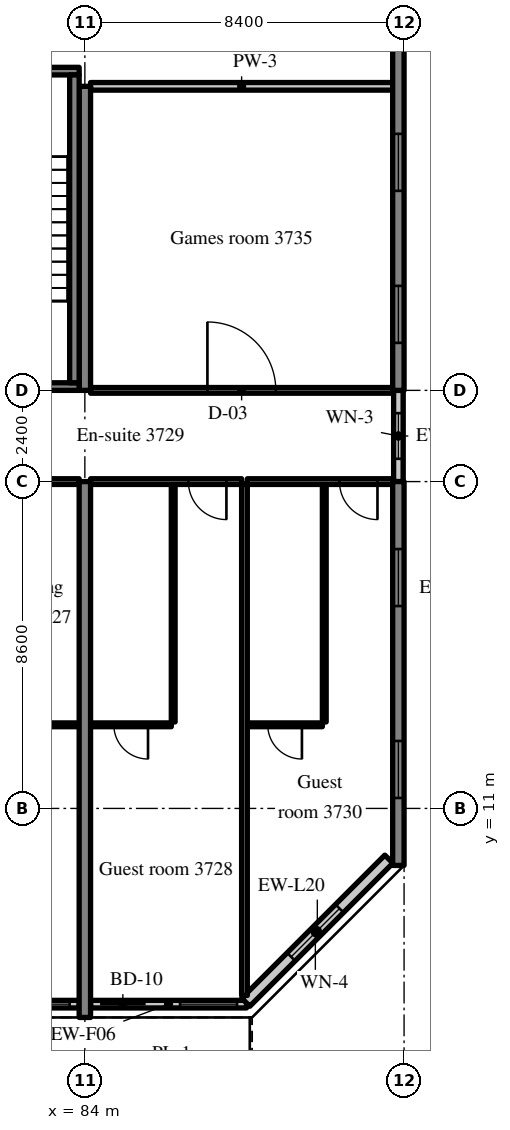
"""IFC4 building model, lengths in metres.
Left out: names, types, materials, properties, quantities, classifications, styles, units other than length and angle.
Written with IfcOpenShell. Run it as: python <this file> out.ifc"""

import sys

from ifc_helpers import new_model, si_unit, direction, frame, frame_2d, origin, place, context, subcontext, project, spatial, rectangle, extrude, source, transform, mapped, element, fill, save


model = new_model("IFC4")
c1 = context("Model", 3, precision=1e-05, world=origin(), true_north=direction((0.0, 1.0)))
c2 = subcontext(c1, "Body", "Model", "MODEL_VIEW")
j1 = project(units=[si_unit("LENGTHUNIT", "METRE"), si_unit("PLANEANGLEUNIT", "RADIAN")], contexts=[c1])
p1 = place(None, origin())
s1 = spatial("IfcSite", under=j1, at=p1, CompositionType="ELEMENT")
p2 = place(p1, origin())
s2 = spatial("IfcBuilding", under=s1, at=p2, CompositionType="ELEMENT")
p3 = place(p2, frame((0.0, 0.0, 155.4)))
s3 = spatial("IfcBuildingStorey", under=s2, at=p3, CompositionType="ELEMENT", Elevation=155.4)
m1 = source(origin(), c2, "Body", "SweptSolid", [
    extrude(rectangle(XDim=14.1, YDim=0.3, at=frame_2d((7.05, 0.0))), origin(), (0.0, 0.0, 1.0), 3.52),
])
p4 = place(p3, frame((84.0, 5.5, 0.0), z_axis=(0.0, 0.0, 1.0), x_axis=(0.0, 1.0, 0.0)))
e1 = element("IfcWall", 1, at=p4, inside=s3, PredefinedType="SHEAR", context=c2, shape_type="MappedRepresentation", body=[
    mapped(m1, transform((0.0, 0.0, 0.0), scale=1.0)),
])
m2 = source(origin(), c2, "Body", "SweptSolid", [
    extrude(rectangle(XDim=8.0, YDim=0.3, at=frame_2d((4.0, 0.0))), origin(), (0.0, 0.0, 1.0), 3.52),
])
p5 = place(p3, frame((84.0, 22.0, 0.0), z_axis=(0.0, 0.0, 1.0), x_axis=(0.0, 1.0, 0.0)))
e2 = element("IfcWall", 2, at=p5, inside=s3, PredefinedType="SHEAR", context=c2, shape_type="MappedRepresentation", body=[
    mapped(m2, transform((0.0, 0.0, 0.0), scale=1.0)),
])
m3 = source(origin(), c2, "Body", "SweptSolid", [
    extrude(rectangle(XDim=10.1, YDim=0.3, at=frame_2d((5.05, 0.0))), origin(), (0.0, 0.0, 1.0), 3.52),
])
p6 = place(p3, frame((92.25, 9.5, 0.0), z_axis=(0.0, 0.0, 1.0), x_axis=(0.0, 1.0, 0.0)))
e3 = element("IfcWall", 3, at=p6, inside=s3, PredefinedType="SHEAR", context=c2, shape_type="MappedRepresentation", body=[
    mapped(m3, transform((0.0, 0.0, 0.0), scale=1.0)),
])
m4 = source(origin(), c2, "Body", "SweptSolid", [
    extrude(rectangle(XDim=1.5, YDim=1.5, at=frame_2d((0.75, 0.75))), frame((0.0, 0.16, 0.0), z_axis=(0.0, -1.0, 0.0), x_axis=(1.0, 0.0, 0.0)), (0.0, 0.0, 1.0), 0.32),
])
p7 = place(p6, frame((1.775, 0.0, 0.9)))
e4 = element("IfcOpeningElement", 4, at=p7, cuts=e3, PredefinedType="OPENING", context=c2, shape_type="MappedRepresentation", body=[
    mapped(m4, transform((0.0, 0.0, 0.0), scale=1.0)),
])
p8 = place(p6, frame((6.825, 0.0, 0.9)))
e5 = element("IfcOpeningElement", 5, at=p8, cuts=e3, PredefinedType="OPENING", context=c2, shape_type="MappedRepresentation", body=[
    mapped(m4, transform((0.0, 0.0, 0.0), scale=1.0)),
])
m5 = source(origin(), c2, "Body", "SweptSolid", [
    extrude(rectangle(XDim=16.0, YDim=0.3, at=frame_2d((8.0, 0.0))), origin(), (0.0, 0.0, 1.0), 3.52),
])
p9 = place(p3, frame((92.25, 22.0, 0.0), z_axis=(0.0, 0.0, 1.0), x_axis=(0.0, 1.0, 0.0)))
e6 = element("IfcWall", 6, at=p9, inside=s3, PredefinedType="SHEAR", context=c2, shape_type="MappedRepresentation", body=[
    mapped(m5, transform((0.0, 0.0, 0.0), scale=1.0)),
])
p10 = place(p9, frame((1.25, 0.0, 0.9)))
e7 = element("IfcOpeningElement", 7, at=p10, cuts=e6, PredefinedType="OPENING", context=c2, shape_type="MappedRepresentation", body=[
    mapped(m4, transform((0.0, 0.0, 0.0), scale=1.0)),
])
p11 = place(p9, frame((5.25, 0.0, 0.9)))
e8 = element("IfcOpeningElement", 8, at=p11, cuts=e6, PredefinedType="OPENING", context=c2, shape_type="MappedRepresentation", body=[
    mapped(m4, transform((0.0, 0.0, 0.0), scale=1.0)),
])
p12 = place(p9, frame((9.25, 0.0, 0.9)))
e9 = element("IfcOpeningElement", 9, at=p12, cuts=e6, PredefinedType="OPENING", context=c2, shape_type="MappedRepresentation", body=[
    mapped(m4, transform((0.0, 0.0, 0.0), scale=1.0)),
])
p13 = place(p9, frame((13.25, 0.0, 0.9)))
e10 = element("IfcOpeningElement", 10, at=p13, cuts=e6, PredefinedType="OPENING", context=c2, shape_type="MappedRepresentation", body=[
    mapped(m4, transform((0.0, 0.0, 0.0), scale=1.0)),
])
m6 = source(origin(), c2, "Body", "SweptSolid", [
    extrude(rectangle(XDim=8.1, YDim=0.2, at=frame_2d((4.05, 0.0))), origin(), (0.0, 0.0, 1.0), 2.87),
])
p14 = place(p3, frame((75.75, 5.85, 0.0), z_axis=(0.0, 0.0, 1.0), x_axis=(1.0, 0.0, 0.0)))
e11 = element("IfcWall", 11, at=p14, inside=s3, PredefinedType="SOLIDWALL", context=c2, shape_type="MappedRepresentation", body=[
    mapped(m6, transform((0.0, 0.0, 0.0), scale=1.0)),
])
m7 = source(origin(), c2, "Body", "SweptSolid", [
    extrude(rectangle(XDim=1.2, YDim=2.4, at=frame_2d((0.6, 1.2))), frame((0.0, 0.11, 0.0), z_axis=(0.0, -1.0, 0.0), x_axis=(1.0, 0.0, 0.0)), (0.0, 0.0, 1.0), 0.22),
])
p15 = place(p14, frame((0.25, 0.0, 0.0)))
e12 = element("IfcOpeningElement", 12, at=p15, cuts=e11, PredefinedType="OPENING", context=c2, shape_type="MappedRepresentation", body=[
    mapped(m7, transform((0.0, 0.0, 0.0), scale=1.0)),
])
m8 = source(origin(), c2, "Body", "SweptSolid", [
    extrude(rectangle(XDim=1.5, YDim=1.5, at=frame_2d((0.75, 0.75))), frame((0.0, 0.11, 0.0), z_axis=(0.0, -1.0, 0.0), x_axis=(1.0, 0.0, 0.0)), (0.0, 0.0, 1.0), 0.22),
])
p16 = place(p14, frame((2.3, 0.0, 0.9)))
e13 = element("IfcOpeningElement", 13, at=p16, cuts=e11, PredefinedType="OPENING", context=c2, shape_type="MappedRepresentation", body=[
    mapped(m8, transform((0.0, 0.0, 0.0), scale=1.0)),
])
p17 = place(p14, frame((4.3, 0.0, 0.0)))
e14 = element("IfcOpeningElement", 14, at=p17, cuts=e11, PredefinedType="OPENING", context=c2, shape_type="MappedRepresentation", body=[
    mapped(m7, transform((0.0, 0.0, 0.0), scale=1.0)),
])
p18 = place(p14, frame((6.35, 0.0, 0.9)))
e15 = element("IfcOpeningElement", 15, at=p18, cuts=e11, PredefinedType="OPENING", context=c2, shape_type="MappedRepresentation", body=[
    mapped(m8, transform((0.0, 0.0, 0.0), scale=1.0)),
])
m9 = source(origin(), c2, "Body", "SweptSolid", [
    extrude(rectangle(XDim=4.105, YDim=0.2, at=frame_2d((2.052, 0.0))), origin(), (0.0, 0.0, 1.0), 2.87),
])
p19 = place(p3, frame((84.15, 5.85, 0.0), z_axis=(0.0, 0.0, 1.0), x_axis=(1.0, 0.0, 0.0)))
e16 = element("IfcWall", 16, at=p19, inside=s3, PredefinedType="SOLIDWALL", context=c2, shape_type="MappedRepresentation", body=[
    mapped(m9, transform((0.0, 0.0, 0.0), scale=1.0)),
])
p20 = place(p19, frame((0.25, 0.0, 0.0)))
e17 = element("IfcOpeningElement", 17, at=p20, cuts=e16, PredefinedType="OPENING", context=c2, shape_type="MappedRepresentation", body=[
    mapped(m7, transform((0.0, 0.0, 0.0), scale=1.0)),
])
p21 = place(p19, frame((2.355, 0.0, 0.9)))
e18 = element("IfcOpeningElement", 18, at=p21, cuts=e16, PredefinedType="OPENING", context=c2, shape_type="MappedRepresentation", body=[
    mapped(m8, transform((0.0, 0.0, 0.0), scale=1.0)),
])
m10 = source(origin(), c2, "Body", "SweptSolid", [
    extrude(rectangle(XDim=5.326, YDim=0.3, at=frame_2d((2.663, 0.0))), origin(), (0.0, 0.0, 1.0), 3.52),
])
p22 = place(p3, frame((88.234, 5.9, 0.0), z_axis=(0.0, 0.0, 1.0), x_axis=(0.707083859269, 0.707129702361, 0.0)))
e19 = element("IfcWall", 19, at=p22, inside=s3, PredefinedType="SOLIDWALL", context=c2, shape_type="MappedRepresentation", body=[
    mapped(m10, transform((0.0, 0.0, 0.0), scale=1.0)),
])
m11 = source(origin(), c2, "Body", "SweptSolid", [
    extrude(rectangle(XDim=1.8, YDim=1.5, at=frame_2d((0.9, 0.75))), frame((0.0, 0.16, 0.0), z_axis=(0.0, -1.0, 0.0), x_axis=(1.0, 0.0, 0.0)), (0.0, 0.0, 1.0), 0.32),
])
p23 = place(p22, frame((1.689, 0.0, 0.9)))
e20 = element("IfcOpeningElement", 20, at=p23, cuts=e19, PredefinedType="OPENING", context=c2, shape_type="MappedRepresentation", body=[
    mapped(m11, transform((0.0, 0.0, 0.0), scale=1.0)),
])
m12 = source(origin(), c2, "Body", "SweptSolid", [
    extrude(rectangle(XDim=2.4, YDim=0.25, at=frame_2d((1.2, 0.0))), origin(), (0.0, 0.0, 1.0), 2.62),
])
p24 = place(p3, frame((92.25, 19.6, 0.0), z_axis=(0.0, 0.0, 1.0), x_axis=(0.0, 1.0, 0.0)))
e21 = element("IfcWall", 21, at=p24, inside=s3, PredefinedType="SOLIDWALL", context=c2, shape_type="MappedRepresentation", body=[
    mapped(m12, transform((0.0, 0.0, 0.0), scale=1.0)),
])
m13 = source(origin(), c2, "Body", "SweptSolid", [
    extrude(rectangle(XDim=1.2, YDim=1.5, at=frame_2d((0.6, 0.75))), frame((0.0, 0.135, 0.0), z_axis=(0.0, -1.0, 0.0), x_axis=(1.0, 0.0, 0.0)), (0.0, 0.0, 1.0), 0.27),
])
p25 = place(p24, frame((0.6, 0.0, 0.9)))
e22 = element("IfcOpeningElement", 22, at=p25, cuts=e21, PredefinedType="OPENING", context=c2, shape_type="MappedRepresentation", body=[
    mapped(m13, transform((0.0, 0.0, 0.0), scale=1.0)),
])
m14 = source(origin(), c2, "Body", "SweptSolid", [
    extrude(rectangle(XDim=8.25, YDim=0.2, at=frame_2d((4.125, 0.0))), origin(), (0.0, 0.0, 1.0), 3.52),
])
p26 = place(p3, frame((83.85, 22.1, 0.0), z_axis=(0.0, 0.0, 1.0), x_axis=(-1.0, 0.0, 0.0)))
e23 = element("IfcWall", 23, at=p26, inside=s3, PredefinedType="SOLIDWALL", context=c2, shape_type="MappedRepresentation", body=[
    mapped(m14, transform((0.0, 0.0, 0.0), scale=1.0)),
])
m15 = source(origin(), c2, "Body", "SweptSolid", [
    extrude(rectangle(XDim=1.2, YDim=2.1, at=frame_2d((0.6, 1.05))), frame((0.0, 0.11, 0.0), z_axis=(0.0, -1.0, 0.0), x_axis=(1.0, 0.0, 0.0)), (0.0, 0.0, 1.0), 0.22),
])
p27 = place(p26, frame((6.05, 0.0, 0.0)))
e24 = element("IfcOpeningElement", 24, at=p27, cuts=e23, PredefinedType="OPENING", context=c2, shape_type="MappedRepresentation", body=[
    mapped(m15, transform((0.0, 0.0, 0.0), scale=1.0)),
])
p28 = place(p3, frame((83.85, 30.4, 0.0), z_axis=(0.0, 0.0, 1.0), x_axis=(-1.0, 0.0, 0.0)))
e25 = element("IfcWall", 25, at=p28, inside=s3, PredefinedType="SOLIDWALL", context=c2, shape_type="MappedRepresentation", body=[
    mapped(m14, transform((0.0, 0.0, 0.0), scale=1.0)),
])
m16 = source(origin(), c2, "Body", "SweptSolid", [
    extrude(rectangle(XDim=1.0, YDim=2.1, at=frame_2d((0.5, 1.05))), frame((0.0, 0.11, 0.0), z_axis=(0.0, -1.0, 0.0), x_axis=(1.0, 0.0, 0.0)), (0.0, 0.0, 1.0), 0.22),
])
p29 = place(p28, frame((6.15, 0.0, 0.0)))
e26 = element("IfcOpeningElement", 26, at=p29, cuts=e25, PredefinedType="OPENING", context=c2, shape_type="MappedRepresentation", body=[
    mapped(m16, transform((0.0, 0.0, 0.0), scale=1.0)),
])
m17 = source(origin(), c2, "Body", "SweptSolid", [
    extrude(rectangle(XDim=8.1, YDim=0.25, at=frame_2d((4.05, 0.0))), origin(), (0.0, 0.0, 1.0), 3.52),
])
p30 = place(p3, frame((83.725, 22.2, 0.0), z_axis=(0.0, 0.0, 1.0), x_axis=(0.0, 1.0, 0.0)))
e27 = element("IfcWall", 27, at=p30, inside=s3, PredefinedType="SOLIDWALL", context=c2, shape_type="MappedRepresentation", body=[
    mapped(m17, transform((0.0, 0.0, 0.0), scale=1.0)),
])
m18 = source(origin(), c2, "Body", "SweptSolid", [
    extrude(rectangle(XDim=2.65, YDim=0.1, at=frame_2d((1.325, 0.0))), origin(), (0.0, 0.0, 1.0), 3.52),
])
p31 = place(p3, frame((81.2, 13.2, 0.0), z_axis=(0.0, 0.0, 1.0), x_axis=(1.0, 0.0, 0.0)))
e28 = element("IfcWall", 28, at=p31, inside=s3, PredefinedType="PARTITIONING", context=c2, shape_type="MappedRepresentation", body=[
    mapped(m18, transform((0.0, 0.0, 0.0), scale=1.0)),
])
m19 = source(origin(), c2, "Body", "SweptSolid", [
    extrude(rectangle(XDim=0.9, YDim=2.1, at=frame_2d((0.45, 1.05))), frame((0.0, 0.06, 0.0), z_axis=(0.0, -1.0, 0.0), x_axis=(1.0, 0.0, 0.0)), (0.0, 0.0, 1.0), 0.12),
])
p32 = place(p31, frame((0.875, 0.0, 0.0)))
e29 = element("IfcOpeningElement", 29, at=p32, cuts=e28, PredefinedType="OPENING", context=c2, shape_type="MappedRepresentation", body=[
    mapped(m19, transform((0.0, 0.0, 0.0), scale=1.0)),
])
m20 = source(origin(), c2, "Body", "SweptSolid", [
    extrude(rectangle(XDim=8.1, YDim=0.15, at=frame_2d((4.05, 0.0))), origin(), (0.0, 0.0, 1.0), 2.82),
])
p33 = place(p3, frame((75.75, 19.6, 0.0), z_axis=(0.0, 0.0, 1.0), x_axis=(1.0, 0.0, 0.0)))
e30 = element("IfcWall", 30, at=p33, inside=s3, PredefinedType="PARTITIONING", context=c2, shape_type="MappedRepresentation", body=[
    mapped(m20, transform((0.0, 0.0, 0.0), scale=1.0)),
])
m21 = source(origin(), c2, "Body", "SweptSolid", [
    extrude(rectangle(XDim=1.0, YDim=2.1, at=frame_2d((0.5, 1.05))), frame((0.0, 0.085, 0.0), z_axis=(0.0, -1.0, 0.0), x_axis=(1.0, 0.0, 0.0)), (0.0, 0.0, 1.0), 0.17),
])
p34 = place(p33, frame((0.4, 0.0, 0.0)))
e31 = element("IfcOpeningElement", 31, at=p34, cuts=e30, PredefinedType="OPENING", context=c2, shape_type="MappedRepresentation", body=[
    mapped(m21, transform((0.0, 0.0, 0.0), scale=1.0)),
])
m22 = source(origin(), c2, "Body", "SweptSolid", [
    extrude(rectangle(XDim=6.25, YDim=0.1, at=frame_2d((3.125, 0.0))), origin(), (0.0, 0.0, 1.0), 3.52),
])
p35 = place(p3, frame((86.325, 13.275, 0.0), z_axis=(0.0, 0.0, 1.0), x_axis=(0.0, 1.0, 0.0)))
e32 = element("IfcWall", 32, at=p35, inside=s3, PredefinedType="PARTITIONING", context=c2, shape_type="MappedRepresentation", body=[
    mapped(m22, transform((0.0, 0.0, 0.0), scale=1.0)),
])
m23 = source(origin(), c2, "Body", "SweptSolid", [
    extrude(rectangle(XDim=2.125, YDim=0.1, at=frame_2d((1.062, 0.0))), origin(), (0.0, 0.0, 1.0), 3.52),
])
p36 = place(p3, frame((84.15, 13.2, 0.0), z_axis=(0.0, 0.0, 1.0), x_axis=(1.0, 0.0, 0.0)))
e33 = element("IfcWall", 33, at=p36, inside=s3, PredefinedType="PARTITIONING", context=c2, shape_type="MappedRepresentation", body=[
    mapped(m23, transform((0.0, 0.0, 0.0), scale=1.0)),
])
p37 = place(p36, frame((0.612, 0.0, 0.0)))
e34 = element("IfcOpeningElement", 34, at=p37, cuts=e33, PredefinedType="OPENING", context=c2, shape_type="MappedRepresentation", body=[
    mapped(m19, transform((0.0, 0.0, 0.0), scale=1.0)),
])
m24 = source(origin(), c2, "Body", "SweptSolid", [
    extrude(rectangle(XDim=3.975, YDim=0.15, at=frame_2d((1.988, 0.0))), origin(), (0.0, 0.0, 1.0), 2.82),
])
p38 = place(p3, frame((84.15, 19.6, 0.0), z_axis=(0.0, 0.0, 1.0), x_axis=(1.0, 0.0, 0.0)))
e35 = element("IfcWall", 35, at=p38, inside=s3, PredefinedType="PARTITIONING", context=c2, shape_type="MappedRepresentation", body=[
    mapped(m24, transform((0.0, 0.0, 0.0), scale=1.0)),
])
p39 = place(p38, frame((2.575, 0.0, 0.0)))
e36 = element("IfcOpeningElement", 36, at=p39, cuts=e35, PredefinedType="OPENING", context=c2, shape_type="MappedRepresentation", body=[
    mapped(m21, transform((0.0, 0.0, 0.0), scale=1.0)),
])
p40 = place(p3, frame((90.3, 13.275, 0.0), z_axis=(0.0, 0.0, 1.0), x_axis=(0.0, 1.0, 0.0)))
e37 = element("IfcWall", 37, at=p40, inside=s3, PredefinedType="PARTITIONING", context=c2, shape_type="MappedRepresentation", body=[
    mapped(m22, transform((0.0, 0.0, 0.0), scale=1.0)),
])
m25 = source(origin(), c2, "Body", "SweptSolid", [
    extrude(rectangle(XDim=1.975, YDim=0.1, at=frame_2d((0.988, 0.0))), origin(), (0.0, 0.0, 1.0), 3.52),
])
p41 = place(p3, frame((88.275, 13.2, 0.0), z_axis=(0.0, 0.0, 1.0), x_axis=(1.0, 0.0, 0.0)))
e38 = element("IfcWall", 38, at=p41, inside=s3, PredefinedType="PARTITIONING", context=c2, shape_type="MappedRepresentation", body=[
    mapped(m25, transform((0.0, 0.0, 0.0), scale=1.0)),
])
p42 = place(p41, frame((0.537, 0.0, 0.0)))
e39 = element("IfcOpeningElement", 39, at=p42, cuts=e38, PredefinedType="OPENING", context=c2, shape_type="MappedRepresentation", body=[
    mapped(m19, transform((0.0, 0.0, 0.0), scale=1.0)),
])
m26 = source(origin(), c2, "Body", "SweptSolid", [
    extrude(rectangle(XDim=3.825, YDim=0.15, at=frame_2d((1.913, 0.0))), origin(), (0.0, 0.0, 1.0), 2.82),
])
p43 = place(p3, frame((88.275, 19.6, 0.0), z_axis=(0.0, 0.0, 1.0), x_axis=(1.0, 0.0, 0.0)))
e40 = element("IfcWall", 40, at=p43, inside=s3, PredefinedType="PARTITIONING", context=c2, shape_type="MappedRepresentation", body=[
    mapped(m26, transform((0.0, 0.0, 0.0), scale=1.0)),
])
p44 = place(p43, frame((2.425, 0.0, 0.0)))
e41 = element("IfcOpeningElement", 41, at=p44, cuts=e40, PredefinedType="OPENING", context=c2, shape_type="MappedRepresentation", body=[
    mapped(m21, transform((0.0, 0.0, 0.0), scale=1.0)),
])
m27 = source(origin(), c2, "Body", "SweptSolid", [
    extrude(rectangle(XDim=13.447, YDim=0.15, at=frame_2d((6.724, 0.0))), origin(), (0.0, 0.0, 1.0), 3.52),
])
p45 = place(p3, frame((88.2, 6.078, 0.0), z_axis=(0.0, 0.0, 1.0), x_axis=(0.0, 1.0, 0.0)))
e42 = element("IfcWall", 42, at=p45, inside=s3, PredefinedType="PARTITIONING", context=c2, shape_type="MappedRepresentation", body=[
    mapped(m27, transform((0.0, 0.0, 0.0), scale=1.0)),
])
m28 = source(origin(), c2, "Body", "SweptSolid", [
    extrude(rectangle(XDim=7.95, YDim=0.15, at=frame_2d((3.975, 0.0))), origin(), (0.0, 0.0, 1.0), 2.82),
])
p46 = place(p3, frame((84.15, 22.0, 0.0), z_axis=(0.0, 0.0, 1.0), x_axis=(1.0, 0.0, 0.0)))
e43 = element("IfcWall", 43, at=p46, inside=s3, PredefinedType="PARTITIONING", context=c2, shape_type="MappedRepresentation", body=[
    mapped(m28, transform((0.0, 0.0, 0.0), scale=1.0)),
])
m29 = source(origin(), c2, "Body", "SweptSolid", [
    extrude(rectangle(XDim=1.8, YDim=2.1, at=frame_2d((0.9, 1.05))), frame((0.0, 0.085, 0.0), z_axis=(0.0, -1.0, 0.0), x_axis=(1.0, 0.0, 0.0)), (0.0, 0.0, 1.0), 0.17),
])
p47 = place(p46, frame((3.075, 0.0, 0.0)))
e44 = element("IfcOpeningElement", 44, at=p47, cuts=e43, PredefinedType="OPENING", context=c2, shape_type="MappedRepresentation", body=[
    mapped(m29, transform((0.0, 0.0, 0.0), scale=1.0)),
])
m30 = source(origin(), c2, "Body", "SweptSolid", [
    extrude(rectangle(XDim=7.95, YDim=0.2, at=frame_2d((3.975, 0.0))), origin(), (0.0, 0.0, 1.0), 3.52),
])
p48 = place(p3, frame((84.15, 30.0, 0.0), z_axis=(0.0, 0.0, 1.0), x_axis=(1.0, 0.0, 0.0)))
e45 = element("IfcWall", 45, at=p48, inside=s3, PredefinedType="PARTITIONING", context=c2, shape_type="MappedRepresentation", body=[
    mapped(m30, transform((0.0, 0.0, 0.0), scale=1.0)),
])
m31 = source(origin(), c2, "Body", "SweptSolid", [
    extrude(rectangle(XDim=1.5, YDim=1.5, at=frame_2d((0.75, 0.75))), frame((0.0, 0.03, 0.0), z_axis=(0.0, -1.0, 0.0), x_axis=(1.0, 0.0, 0.0)), (0.0, 0.0, 1.0), 0.06),
])
p49 = place(p18, origin())
e46 = element("IfcWindow", 46, at=p49, inside=s3, PartitioningType="SINGLE_PANEL", PredefinedType="WINDOW", context=c2, shape_type="MappedRepresentation", body=[
    mapped(m31, transform((0.0, 0.0, 0.0), scale=1.0)),
])
fill(e15, e46)
m32 = source(origin(), c2, "Body", "SweptSolid", [
    extrude(rectangle(XDim=1.2, YDim=2.4, at=frame_2d((0.6, 1.2))), frame((0.0, 0.025, 0.0), z_axis=(0.0, -1.0, 0.0), x_axis=(1.0, 0.0, 0.0)), (0.0, 0.0, 1.0), 0.05),
])
p50 = place(p20, origin())
e47 = element("IfcDoor", 47, at=p50, inside=s3, OperationType="SLIDING_TO_RIGHT", PredefinedType="DOOR", context=c2, shape_type="MappedRepresentation", body=[
    mapped(m32, transform((0.0, 0.0, 0.0), scale=1.0)),
])
fill(e17, e47)
p51 = place(p21, origin())
e48 = element("IfcWindow", 48, at=p51, inside=s3, PartitioningType="SINGLE_PANEL", PredefinedType="WINDOW", context=c2, shape_type="MappedRepresentation", body=[
    mapped(m31, transform((0.0, 0.0, 0.0), scale=1.0)),
])
fill(e18, e48)
m33 = source(origin(), c2, "Body", "SweptSolid", [
    extrude(rectangle(XDim=1.8, YDim=1.5, at=frame_2d((0.9, 0.75))), frame((0.0, 0.03, 0.0), z_axis=(0.0, -1.0, 0.0), x_axis=(1.0, 0.0, 0.0)), (0.0, 0.0, 1.0), 0.06),
])
p52 = place(p23, origin())
e49 = element("IfcWindow", 49, at=p52, inside=s3, PartitioningType="SINGLE_PANEL", PredefinedType="WINDOW", context=c2, shape_type="MappedRepresentation", body=[
    mapped(m33, transform((0.0, 0.0, 0.0), scale=1.0)),
])
fill(e20, e49)
p53 = place(p7, origin())
e50 = element("IfcWindow", 50, at=p53, inside=s3, PartitioningType="SINGLE_PANEL", PredefinedType="WINDOW", context=c2, shape_type="MappedRepresentation", body=[
    mapped(m31, transform((0.0, 0.0, 0.0), scale=1.0)),
])
fill(e4, e50)
p54 = place(p8, origin())
e51 = element("IfcWindow", 51, at=p54, inside=s3, PartitioningType="SINGLE_PANEL", PredefinedType="WINDOW", context=c2, shape_type="MappedRepresentation", body=[
    mapped(m31, transform((0.0, 0.0, 0.0), scale=1.0)),
])
fill(e5, e51)
p55 = place(p10, origin())
e52 = element("IfcWindow", 52, at=p55, inside=s3, PartitioningType="SINGLE_PANEL", PredefinedType="WINDOW", context=c2, shape_type="MappedRepresentation", body=[
    mapped(m31, transform((0.0, 0.0, 0.0), scale=1.0)),
])
fill(e7, e52)
p56 = place(p11, origin())
e53 = element("IfcWindow", 53, at=p56, inside=s3, PartitioningType="SINGLE_PANEL", PredefinedType="WINDOW", context=c2, shape_type="MappedRepresentation", body=[
    mapped(m31, transform((0.0, 0.0, 0.0), scale=1.0)),
])
fill(e8, e53)
m34 = source(origin(), c2, "Body", "SweptSolid", [
    extrude(rectangle(XDim=1.2, YDim=1.5, at=frame_2d((0.6, 0.75))), frame((0.0, 0.03, 0.0), z_axis=(0.0, -1.0, 0.0), x_axis=(1.0, 0.0, 0.0)), (0.0, 0.0, 1.0), 0.06),
])
p57 = place(p25, origin())
e54 = element("IfcWindow", 54, at=p57, inside=s3, PartitioningType="SINGLE_PANEL", PredefinedType="WINDOW", context=c2, shape_type="MappedRepresentation", body=[
    mapped(m34, transform((0.0, 0.0, 0.0), scale=1.0)),
])
fill(e22, e54)
m35 = source(origin(), c2, "Body", "SweptSolid", [
    extrude(rectangle(XDim=0.9, YDim=2.1, at=frame_2d((0.45, 1.05))), frame((0.0, 0.025, 0.0), z_axis=(0.0, -1.0, 0.0), x_axis=(1.0, 0.0, 0.0)), (0.0, 0.0, 1.0), 0.05),
])
p58 = place(p37, origin())
e55 = element("IfcDoor", 55, at=p58, inside=s3, OperationType="SINGLE_SWING_RIGHT", PredefinedType="DOOR", context=c2, shape_type="MappedRepresentation", body=[
    mapped(m35, transform((0.0, 0.0, 0.0), scale=1.0)),
])
fill(e34, e55)
m36 = source(origin(), c2, "Body", "SweptSolid", [
    extrude(rectangle(XDim=1.0, YDim=2.1, at=frame_2d((0.5, 1.05))), frame((0.0, 0.025, 0.0), z_axis=(0.0, -1.0, 0.0), x_axis=(1.0, 0.0, 0.0)), (0.0, 0.0, 1.0), 0.05),
])
p59 = place(p39, origin())
e56 = element("IfcDoor", 56, at=p59, inside=s3, OperationType="SINGLE_SWING_RIGHT", PredefinedType="DOOR", context=c2, shape_type="MappedRepresentation", body=[
    mapped(m36, transform((0.0, 0.0, 0.0), scale=1.0)),
])
fill(e36, e56)
p60 = place(p42, origin())
e57 = element("IfcDoor", 57, at=p60, inside=s3, OperationType="SINGLE_SWING_RIGHT", PredefinedType="DOOR", context=c2, shape_type="MappedRepresentation", body=[
    mapped(m35, transform((0.0, 0.0, 0.0), scale=1.0)),
])
fill(e39, e57)
p61 = place(p44, origin())
e58 = element("IfcDoor", 58, at=p61, inside=s3, OperationType="SINGLE_SWING_RIGHT", PredefinedType="DOOR", context=c2, shape_type="MappedRepresentation", body=[
    mapped(m36, transform((0.0, 0.0, 0.0), scale=1.0)),
])
fill(e41, e58)
m37 = source(origin(), c2, "Body", "SweptSolid", [
    extrude(rectangle(XDim=1.8, YDim=2.1, at=frame_2d((0.9, 1.05))), frame((0.0, 0.025, 0.0), z_axis=(0.0, -1.0, 0.0), x_axis=(1.0, 0.0, 0.0)), (0.0, 0.0, 1.0), 0.05),
])
p62 = place(p47, origin())
e59 = element("IfcDoor", 59, at=p62, inside=s3, OperationType="DOUBLE_DOOR_SINGLE_SWING", PredefinedType="DOOR", context=c2, shape_type="MappedRepresentation", body=[
    mapped(m37, transform((0.0, 0.0, 0.0), scale=1.0)),
])
fill(e44, e59)
save(model, sys.argv[1])
